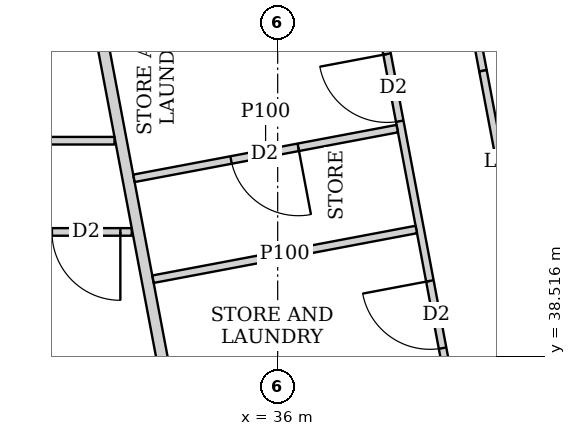
"""IFC4 building model, lengths in metres.
Left out: names, types, materials, properties, quantities, classifications, styles, units other than length and angle.
Written with IfcOpenShell. Run it as: python <this file> out.ifc"""

import sys

from ifc_helpers import new_model, si_unit, direction, frame, frame_2d, origin, place, context, subcontext, project, spatial, rectangle, extrude, element, fill, save


model = new_model("IFC4")
c1 = context("Model", 3, precision=1e-05, world=origin(), true_north=direction((0.0, 1.0)))
c2 = subcontext(c1, "Body", "Model", "MODEL_VIEW")
j1 = project(units=[si_unit("LENGTHUNIT", "METRE"), si_unit("PLANEANGLEUNIT", "RADIAN")], contexts=[c1])
p1 = place(None, origin())
s1 = spatial("IfcSite", under=j1, at=p1, CompositionType="ELEMENT")
p2 = place(p1, origin())
s2 = spatial("IfcBuilding", under=s1, at=p2, CompositionType="ELEMENT")
p3 = place(p2, frame((0.0, 0.0, 139.55)))
s3 = spatial("IfcBuildingStorey", under=s2, at=p3, CompositionType="ELEMENT", Elevation=139.55)
p4 = place(p3, frame((33.623, 43.022, 0.0), z_axis=(0.0, 0.0, 1.0), x_axis=(0.185596841028, -0.98262597798, 0.0)))
e1 = element("IfcWall", 1, at=p4, inside=s3, PredefinedType="SOLIDWALL", context=c2, shape_type="SweptSolid", body=[
    extrude(rectangle(XDim=41.66, YDim=0.15, at=frame_2d((20.83, 0.0))), origin(), (0.0, 0.0, 1.0), 2.5),
])
p5 = place(p4, frame((20.242, 0.0, 0.0)))
e2 = element("IfcOpeningElement", 2, at=p5, cuts=e1, PredefinedType="OPENING", context=c2, shape_type="SweptSolid", body=[
    extrude(rectangle(XDim=1.0, YDim=2.1, at=frame_2d((0.5, 1.05))), frame((0.0, 0.085, 0.0), z_axis=(0.0, -1.0, 0.0), x_axis=(1.0, 0.0, 0.0)), (0.0, 0.0, 1.0), 0.17),
])
p6 = place(p4, frame((24.714, 0.0, 0.0)))
e3 = element("IfcOpeningElement", 3, at=p6, cuts=e1, PredefinedType="OPENING", context=c2, shape_type="SweptSolid", body=[
    extrude(rectangle(XDim=1.0, YDim=2.1, at=frame_2d((0.5, 1.05))), frame((0.0, 0.085, 0.0), z_axis=(0.0, -1.0, 0.0), x_axis=(1.0, 0.0, 0.0)), (0.0, 0.0, 1.0), 0.17),
])
p7 = place(p4, frame((31.206, 0.0, 0.0)))
e4 = element("IfcOpeningElement", 4, at=p7, cuts=e1, PredefinedType="OPENING", context=c2, shape_type="SweptSolid", body=[
    extrude(rectangle(XDim=1.0, YDim=2.1, at=frame_2d((0.5, 1.05))), frame((0.0, 0.085, 0.0), z_axis=(0.0, -1.0, 0.0), x_axis=(1.0, 0.0, 0.0)), (0.0, 0.0, 1.0), 0.17),
])
p8 = place(p3, frame((39.054, 42.085, 0.0), z_axis=(0.0, 0.0, 1.0), x_axis=(-0.185791584218, 0.982589175207, 0.0)))
e5 = element("IfcWall", 5, at=p8, inside=s3, PredefinedType="PARTITIONING", context=c2, shape_type="SweptSolid", body=[
    extrude(rectangle(XDim=3.628, YDim=0.1, at=frame_2d((1.814, 0.0))), origin(), (0.0, 0.0, 1.0), 2.1),
])
p9 = place(p3, frame((38.318, 44.298, 0.0), z_axis=(0.0, 0.0, 1.0), x_axis=(0.185481135188, -0.982647825261, 0.0)))
e6 = element("IfcWall", 6, at=p9, inside=s3, PredefinedType="PARTITIONING", context=c2, shape_type="SweptSolid", body=[
    extrude(rectangle(XDim=2.064, YDim=0.1, at=frame_2d((1.032, 0.0))), origin(), (0.0, 0.0, 1.0), 2.1),
])
p10 = place(p3, frame((38.701, 42.27, 0.0), z_axis=(0.0, 0.0, 1.0), x_axis=(0.185640619081, -0.98261770824, 0.0)))
e7 = element("IfcWall", 7, at=p10, inside=s3, PredefinedType="PARTITIONING", context=c2, shape_type="SweptSolid", body=[
    extrude(rectangle(XDim=17.103, YDim=0.1, at=frame_2d((8.552, 0.0))), origin(), (0.0, 0.0, 1.0), 2.5),
])
p11 = place(p10, frame((16.053, 0.0, 0.0)))
e8 = element("IfcOpeningElement", 8, at=p11, cuts=e7, PredefinedType="OPENING", context=c2, shape_type="SweptSolid", body=[
    extrude(rectangle(XDim=0.9, YDim=2.1, at=frame_2d((0.45, 1.05))), frame((0.0, 0.06, 0.0), z_axis=(0.0, -1.0, 0.0), x_axis=(1.0, 0.0, 0.0)), (0.0, 0.0, 1.0), 0.12),
])
p12 = place(p10, frame((12.077, 0.0, 0.0)))
e9 = element("IfcOpeningElement", 9, at=p12, cuts=e7, PredefinedType="OPENING", context=c2, shape_type="SweptSolid", body=[
    extrude(rectangle(XDim=0.9, YDim=2.1, at=frame_2d((0.45, 1.05))), frame((0.0, 0.06, 0.0), z_axis=(0.0, -1.0, 0.0), x_axis=(1.0, 0.0, 0.0)), (0.0, 0.0, 1.0), 0.12),
])
p13 = place(p10, frame((8.42, 0.0, 0.0)))
e10 = element("IfcOpeningElement", 10, at=p13, cuts=e7, PredefinedType="OPENING", context=c2, shape_type="SweptSolid", body=[
    extrude(rectangle(XDim=0.9, YDim=2.1, at=frame_2d((0.45, 1.05))), frame((0.0, 0.06, 0.0), z_axis=(0.0, -1.0, 0.0), x_axis=(1.0, 0.0, 0.0)), (0.0, 0.0, 1.0), 0.12),
])
p14 = place(p10, frame((4.444, 0.0, 0.0)))
e11 = element("IfcOpeningElement", 11, at=p14, cuts=e7, PredefinedType="OPENING", context=c2, shape_type="SweptSolid", body=[
    extrude(rectangle(XDim=0.9, YDim=2.1, at=frame_2d((0.45, 1.05))), frame((0.0, 0.06, 0.0), z_axis=(0.0, -1.0, 0.0), x_axis=(1.0, 0.0, 0.0)), (0.0, 0.0, 1.0), 0.12),
])
p15 = place(p3, frame((37.411, 42.638, 0.0), z_axis=(0.0, 0.0, 1.0), x_axis=(0.185555586706, -0.982633769134, 0.0)))
e12 = element("IfcWall", 12, at=p15, inside=s3, PredefinedType="PARTITIONING", context=c2, shape_type="SweptSolid", body=[
    extrude(rectangle(XDim=17.704, YDim=0.1, at=frame_2d((8.852, 0.0))), origin(), (0.0, 0.0, 1.0), 2.5),
])
p16 = place(p15, frame((16.28, 0.0, 0.0)))
e13 = element("IfcOpeningElement", 13, at=p16, cuts=e12, PredefinedType="OPENING", context=c2, shape_type="SweptSolid", body=[
    extrude(rectangle(XDim=0.9, YDim=2.1, at=frame_2d((0.45, 1.05))), frame((0.0, 0.06, 0.0), z_axis=(0.0, -1.0, 0.0), x_axis=(1.0, 0.0, 0.0)), (0.0, 0.0, 1.0), 0.12),
])
p17 = place(p15, frame((12.688, 0.0, 0.0)))
e14 = element("IfcOpeningElement", 14, at=p17, cuts=e12, PredefinedType="OPENING", context=c2, shape_type="SweptSolid", body=[
    extrude(rectangle(XDim=0.9, YDim=2.1, at=frame_2d((0.45, 1.05))), frame((0.0, 0.06, 0.0), z_axis=(0.0, -1.0, 0.0), x_axis=(1.0, 0.0, 0.0)), (0.0, 0.0, 1.0), 0.12),
])
p18 = place(p15, frame((8.822, 0.0, 0.0)))
e15 = element("IfcOpeningElement", 15, at=p18, cuts=e12, PredefinedType="OPENING", context=c2, shape_type="SweptSolid", body=[
    extrude(rectangle(XDim=0.9, YDim=2.1, at=frame_2d((0.45, 1.05))), frame((0.0, 0.06, 0.0), z_axis=(0.0, -1.0, 0.0), x_axis=(1.0, 0.0, 0.0)), (0.0, 0.0, 1.0), 0.12),
])
p19 = place(p15, frame((3.188, 0.0, 0.0)))
e16 = element("IfcOpeningElement", 16, at=p19, cuts=e12, PredefinedType="OPENING", context=c2, shape_type="SweptSolid", body=[
    extrude(rectangle(XDim=0.9, YDim=2.1, at=frame_2d((0.45, 1.05))), frame((0.0, 0.06, 0.0), z_axis=(0.0, -1.0, 0.0), x_axis=(1.0, 0.0, 0.0)), (0.0, 0.0, 1.0), 0.12),
])
p20 = place(p15, frame((0.15, 0.0, 0.0)))
e17 = element("IfcOpeningElement", 17, at=p20, cuts=e12, PredefinedType="OPENING", context=c2, shape_type="SweptSolid", body=[
    extrude(rectangle(XDim=0.9, YDim=2.1, at=frame_2d((0.45, 1.05))), frame((0.0, 0.06, 0.0), z_axis=(0.0, -1.0, 0.0), x_axis=(1.0, 0.0, 0.0)), (0.0, 0.0, 1.0), 0.12),
])
p21 = place(p15, frame((14.371, 0.0, 0.0)))
e18 = element("IfcOpeningElement", 18, at=p21, cuts=e12, PredefinedType="OPENING", context=c2, shape_type="SweptSolid", body=[
    extrude(rectangle(XDim=0.9, YDim=2.1, at=frame_2d((0.45, 1.05))), frame((0.0, 0.06, 0.0), z_axis=(0.0, -1.0, 0.0), x_axis=(1.0, 0.0, 0.0)), (0.0, 0.0, 1.0), 0.12),
])
p22 = place(p15, frame((10.78, 0.0, 0.0)))
e19 = element("IfcOpeningElement", 19, at=p22, cuts=e12, PredefinedType="OPENING", context=c2, shape_type="SweptSolid", body=[
    extrude(rectangle(XDim=0.9, YDim=2.1, at=frame_2d((0.45, 1.05))), frame((0.0, 0.06, 0.0), z_axis=(0.0, -1.0, 0.0), x_axis=(1.0, 0.0, 0.0)), (0.0, 0.0, 1.0), 0.12),
])
p23 = place(p15, frame((6.154, 0.0, 0.0)))
e20 = element("IfcOpeningElement", 20, at=p23, cuts=e12, PredefinedType="OPENING", context=c2, shape_type="SweptSolid", body=[
    extrude(rectangle(XDim=0.9, YDim=2.1, at=frame_2d((0.45, 1.05))), frame((0.0, 0.06, 0.0), z_axis=(0.0, -1.0, 0.0), x_axis=(1.0, 0.0, 0.0)), (0.0, 0.0, 1.0), 0.12),
])
p24 = place(p3, frame((37.824, 40.182, 0.0), z_axis=(0.0, 0.0, 1.0), x_axis=(-0.982648794755, -0.185475998897, 0.0)))
e21 = element("IfcWall", 21, at=p24, inside=s3, PredefinedType="PARTITIONING", context=c2, shape_type="SweptSolid", body=[
    extrude(rectangle(XDim=3.525, YDim=0.1, at=frame_2d((1.763, 0.0))), origin(), (0.0, 0.0, 1.0), 3.5),
])
p25 = place(p3, frame((21.6, 41.35, 0.0), z_axis=(0.0, 0.0, 1.0), x_axis=(1.0, 0.0, 0.0)))
e22 = element("IfcWall", 22, at=p25, inside=s3, PredefinedType="PARTITIONING", context=c2, shape_type="SweptSolid", body=[
    extrude(rectangle(XDim=12.253, YDim=0.1, at=frame_2d((6.126, 0.0))), origin(), (0.0, 0.0, 1.0), 3.5),
])
p26 = place(p25, frame((0.2, 0.0, 0.0)))
e23 = element("IfcOpeningElement", 23, at=p26, cuts=e22, PredefinedType="OPENING", context=c2, shape_type="SweptSolid", body=[
    extrude(rectangle(XDim=0.9, YDim=2.1, at=frame_2d((0.45, 1.05))), frame((0.0, 0.06, 0.0), z_axis=(0.0, -1.0, 0.0), x_axis=(1.0, 0.0, 0.0)), (0.0, 0.0, 1.0), 0.12),
])
p27 = place(p25, frame((3.8, 0.0, 0.0)))
e24 = element("IfcOpeningElement", 24, at=p27, cuts=e22, PredefinedType="OPENING", context=c2, shape_type="SweptSolid", body=[
    extrude(rectangle(XDim=0.9, YDim=2.1, at=frame_2d((0.45, 1.05))), frame((0.0, 0.06, 0.0), z_axis=(0.0, -1.0, 0.0), x_axis=(1.0, 0.0, 0.0)), (0.0, 0.0, 1.0), 0.12),
])
p28 = place(p25, frame((7.4, 0.0, 0.0)))
e25 = element("IfcOpeningElement", 25, at=p28, cuts=e22, PredefinedType="OPENING", context=c2, shape_type="SweptSolid", body=[
    extrude(rectangle(XDim=0.9, YDim=2.1, at=frame_2d((0.45, 1.05))), frame((0.0, 0.06, 0.0), z_axis=(0.0, -1.0, 0.0), x_axis=(1.0, 0.0, 0.0)), (0.0, 0.0, 1.0), 0.12),
])
p29 = place(p3, frame((21.6, 40.15, 0.0), z_axis=(0.0, 0.0, 1.0), x_axis=(1.0, 0.0, 0.0)))
e26 = element("IfcWall", 26, at=p29, inside=s3, PredefinedType="PARTITIONING", context=c2, shape_type="SweptSolid", body=[
    extrude(rectangle(XDim=12.48, YDim=0.1, at=frame_2d((6.24, 0.0))), origin(), (0.0, 0.0, 1.0), 3.5),
])
p30 = place(p29, frame((0.575, 0.0, 0.0)))
e27 = element("IfcOpeningElement", 27, at=p30, cuts=e26, PredefinedType="OPENING", context=c2, shape_type="SweptSolid", body=[
    extrude(rectangle(XDim=0.9, YDim=2.1, at=frame_2d((0.45, 1.05))), frame((0.0, 0.06, 0.0), z_axis=(0.0, -1.0, 0.0), x_axis=(1.0, 0.0, 0.0)), (0.0, 0.0, 1.0), 0.12),
])
p31 = place(p29, frame((3.95, 0.0, 0.0)))
e28 = element("IfcOpeningElement", 28, at=p31, cuts=e26, PredefinedType="OPENING", context=c2, shape_type="SweptSolid", body=[
    extrude(rectangle(XDim=0.9, YDim=2.1, at=frame_2d((0.45, 1.05))), frame((0.0, 0.06, 0.0), z_axis=(0.0, -1.0, 0.0), x_axis=(1.0, 0.0, 0.0)), (0.0, 0.0, 1.0), 0.12),
])
p32 = place(p29, frame((7.6, 0.0, 0.0)))
e29 = element("IfcOpeningElement", 29, at=p32, cuts=e26, PredefinedType="OPENING", context=c2, shape_type="SweptSolid", body=[
    extrude(rectangle(XDim=0.9, YDim=2.1, at=frame_2d((0.45, 1.05))), frame((0.0, 0.06, 0.0), z_axis=(0.0, -1.0, 0.0), x_axis=(1.0, 0.0, 0.0)), (0.0, 0.0, 1.0), 0.12),
])
p33 = place(p29, frame((11.43, 0.0, 0.0)))
e30 = element("IfcOpeningElement", 30, at=p33, cuts=e26, PredefinedType="OPENING", context=c2, shape_type="SweptSolid", body=[
    extrude(rectangle(XDim=0.9, YDim=2.1, at=frame_2d((0.45, 1.05))), frame((0.0, 0.06, 0.0), z_axis=(0.0, -1.0, 0.0), x_axis=(1.0, 0.0, 0.0)), (0.0, 0.0, 1.0), 0.12),
])
p34 = place(p29, frame((2.375, 0.0, 0.0)))
e31 = element("IfcOpeningElement", 31, at=p34, cuts=e26, PredefinedType="OPENING", context=c2, shape_type="SweptSolid", body=[
    extrude(rectangle(XDim=0.9, YDim=2.1, at=frame_2d((0.45, 1.05))), frame((0.0, 0.06, 0.0), z_axis=(0.0, -1.0, 0.0), x_axis=(1.0, 0.0, 0.0)), (0.0, 0.0, 1.0), 0.12),
])
p35 = place(p29, frame((5.75, 0.0, 0.0)))
e32 = element("IfcOpeningElement", 32, at=p35, cuts=e26, PredefinedType="OPENING", context=c2, shape_type="SweptSolid", body=[
    extrude(rectangle(XDim=0.9, YDim=2.1, at=frame_2d((0.45, 1.05))), frame((0.0, 0.06, 0.0), z_axis=(0.0, -1.0, 0.0), x_axis=(1.0, 0.0, 0.0)), (0.0, 0.0, 1.0), 0.12),
])
p36 = place(p29, frame((9.4, 0.0, 0.0)))
e33 = element("IfcOpeningElement", 33, at=p36, cuts=e26, PredefinedType="OPENING", context=c2, shape_type="SweptSolid", body=[
    extrude(rectangle(XDim=0.9, YDim=2.1, at=frame_2d((0.45, 1.05))), frame((0.0, 0.06, 0.0), z_axis=(0.0, -1.0, 0.0), x_axis=(1.0, 0.0, 0.0)), (0.0, 0.0, 1.0), 0.12),
])
p37 = place(p3, frame((37.573, 41.509, 0.0), z_axis=(0.0, 0.0, 1.0), x_axis=(-0.982638553676, -0.185530247748, 0.0)))
e34 = element("IfcWall", 34, at=p37, inside=s3, PredefinedType="PARTITIONING", context=c2, shape_type="SweptSolid", body=[
    extrude(rectangle(XDim=3.525, YDim=0.1, at=frame_2d((1.763, 0.0))), origin(), (0.0, 0.0, 1.0), 3.5),
])
p38 = place(p37, frame((1.325, 0.0, 0.0)))
e35 = element("IfcOpeningElement", 35, at=p38, cuts=e34, PredefinedType="OPENING", context=c2, shape_type="SweptSolid", body=[
    extrude(rectangle(XDim=0.9, YDim=2.1, at=frame_2d((0.45, 1.05))), frame((0.0, 0.06, 0.0), z_axis=(0.0, -1.0, 0.0), x_axis=(1.0, 0.0, 0.0)), (0.0, 0.0, 1.0), 0.12),
])
p39 = place(p19, origin())
e36 = element("IfcDoor", 36, at=p39, inside=s3, OperationType="SINGLE_SWING_RIGHT", PredefinedType="DOOR", context=c2, shape_type="SweptSolid", body=[
    extrude(rectangle(XDim=0.9, YDim=2.1, at=frame_2d((0.45, 1.05))), frame((0.0, 0.025, 0.0), z_axis=(0.0, -1.0, 0.0), x_axis=(1.0, 0.0, 0.0)), (0.0, 0.0, 1.0), 0.05),
])
fill(e16, e36)
p40 = place(p20, origin())
e37 = element("IfcDoor", 37, at=p40, inside=s3, OperationType="SINGLE_SWING_RIGHT", PredefinedType="DOOR", context=c2, shape_type="SweptSolid", body=[
    extrude(rectangle(XDim=0.9, YDim=2.1, at=frame_2d((0.45, 1.05))), frame((0.0, 0.025, 0.0), z_axis=(0.0, -1.0, 0.0), x_axis=(1.0, 0.0, 0.0)), (0.0, 0.0, 1.0), 0.05),
])
fill(e17, e37)
p41 = place(p33, origin())
e38 = element("IfcDoor", 38, at=p41, inside=s3, OperationType="SINGLE_SWING_LEFT", PredefinedType="DOOR", context=c2, shape_type="SweptSolid", body=[
    extrude(rectangle(XDim=0.9, YDim=2.1, at=frame_2d((0.45, 1.05))), frame((0.0, 0.025, 0.0), z_axis=(0.0, -1.0, 0.0), x_axis=(1.0, 0.0, 0.0)), (0.0, 0.0, 1.0), 0.05),
])
fill(e30, e38)
p42 = place(p38, origin())
e39 = element("IfcDoor", 39, at=p42, inside=s3, OperationType="SINGLE_SWING_LEFT", PredefinedType="DOOR", context=c2, shape_type="SweptSolid", body=[
    extrude(rectangle(XDim=0.9, YDim=2.1, at=frame_2d((0.45, 1.05))), frame((0.0, 0.025, 0.0), z_axis=(0.0, -1.0, 0.0), x_axis=(1.0, 0.0, 0.0)), (0.0, 0.0, 1.0), 0.05),
])
fill(e35, e39)
save(model, sys.argv[1])
